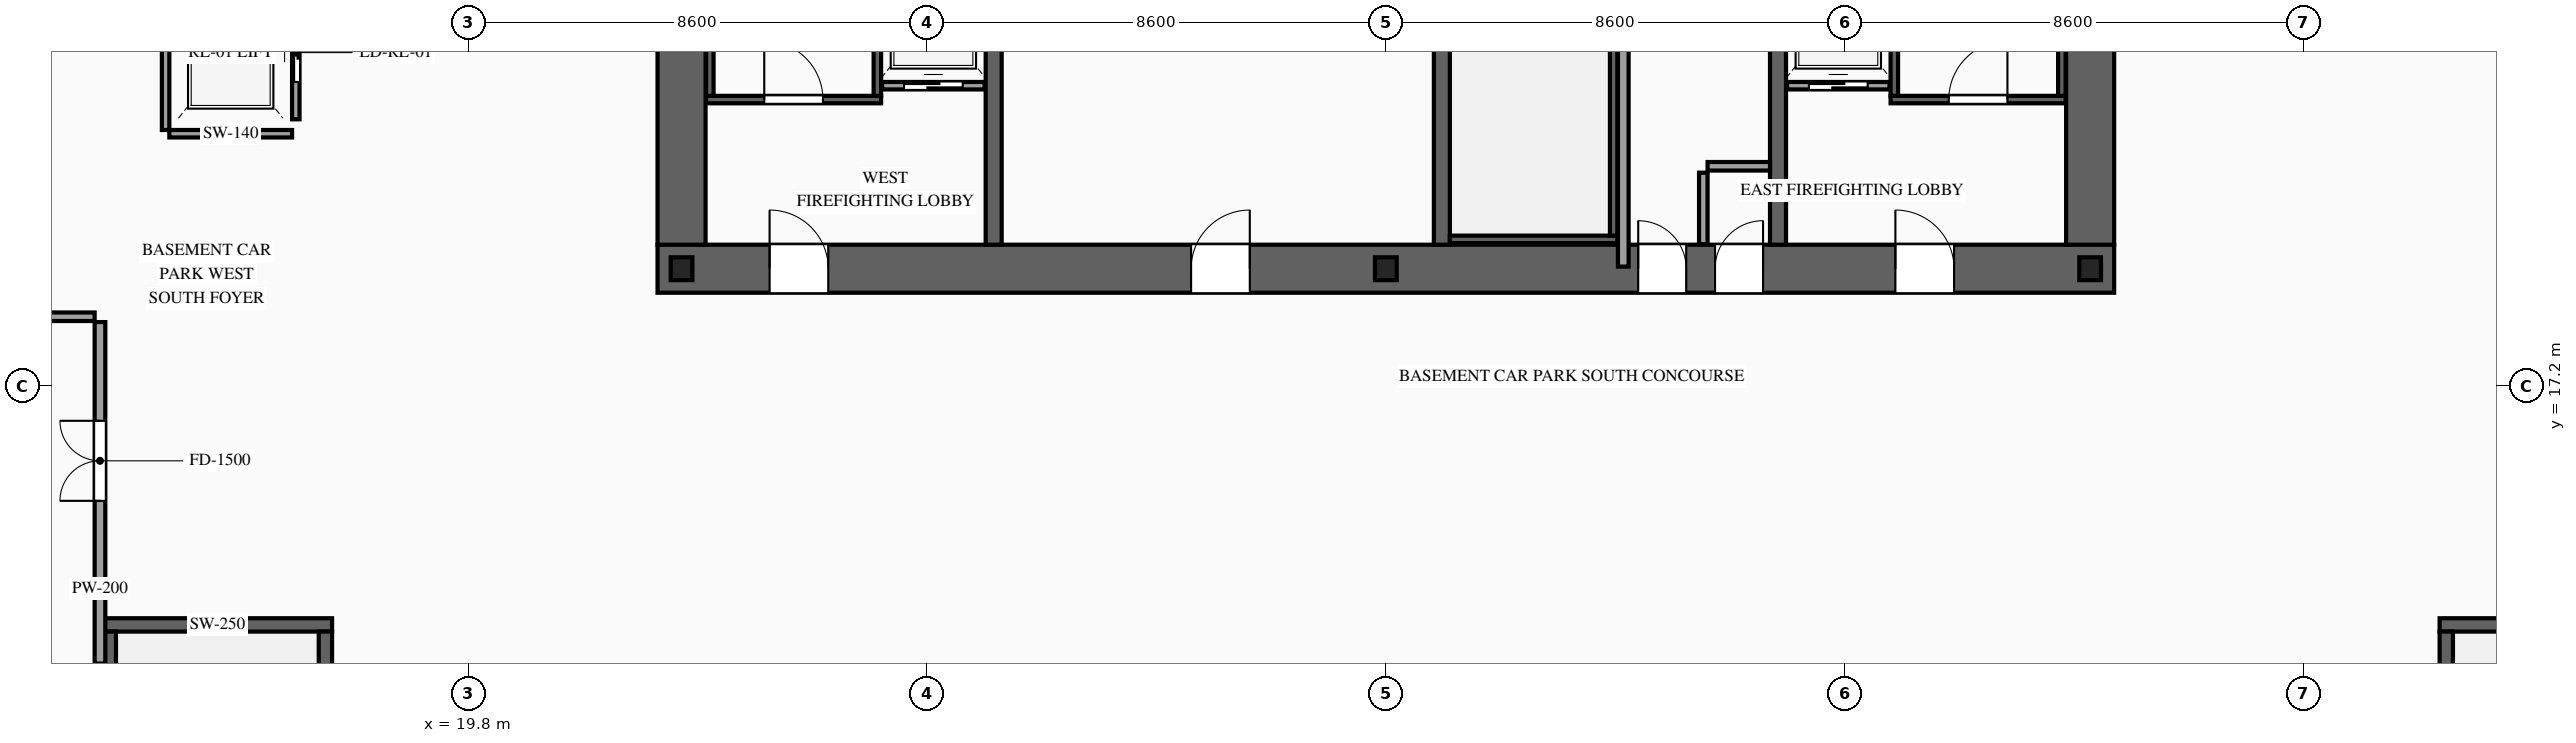
"""IFC4 building model, lengths in metres.
Left out: names, types, materials, properties, quantities, classifications, styles, units other than length and angle.
Written with IfcOpenShell. Run it as: python <this file> out.ifc"""

import sys

from ifc_helpers import new_model, si_unit, direction, frame, frame_2d, origin, origin_2d, place, context, subcontext, project, spatial, rectangle, i_section, extrude, source, transform, mapped, element, fill, save


model = new_model("IFC4")
c1 = context("Model", 3, precision=1e-05, world=origin(), true_north=direction((0.0, 1.0)))
c2 = subcontext(c1, "Body", "Model", "MODEL_VIEW")
j1 = project(units=[si_unit("LENGTHUNIT", "METRE"), si_unit("PLANEANGLEUNIT", "RADIAN")], contexts=[c1])
p1 = place(None, origin())
s1 = spatial("IfcSite", under=j1, at=p1, CompositionType="ELEMENT")
p2 = place(p1, origin())
s2 = spatial("IfcBuilding", under=s1, at=p2, CompositionType="ELEMENT")
p3 = place(p2, frame((0.0, 0.0, -9.0)))
s3 = spatial("IfcBuildingStorey", under=s2, at=p3, CompositionType="ELEMENT", Elevation=-9.0)
p4 = place(p3, frame((23.35, 19.4, 0.0), z_axis=(0.0, 0.0, 1.0), x_axis=(1.0, 0.0, 0.0)))
e1 = element("IfcWall", 1, at=p4, inside=s3, PredefinedType="SHEAR", context=c2, shape_type="SweptSolid", body=[
    extrude(rectangle(XDim=27.3, YDim=0.9, at=frame_2d((13.65, 0.0))), origin(), (0.0, 0.0, 1.0), 4.5),
])
p5 = place(p4, frame((2.1, 0.0, 0.0)))
e2 = element("IfcOpeningElement", 2, at=p5, cuts=e1, PredefinedType="OPENING", context=c2, shape_type="SweptSolid", body=[
    extrude(rectangle(XDim=1.1, YDim=2.2, at=frame_2d((0.55, 1.1))), frame((0.0, 0.465, 0.0), z_axis=(0.0, -1.0, 0.0), x_axis=(1.0, 0.0, 0.0)), (0.0, 0.0, 1.0), 0.93),
])
p6 = place(p4, frame((10.0, 0.0, 0.0)))
e3 = element("IfcOpeningElement", 3, at=p6, cuts=e1, PredefinedType="OPENING", context=c2, shape_type="SweptSolid", body=[
    extrude(rectangle(XDim=1.1, YDim=2.2, at=frame_2d((0.55, 1.1))), frame((0.0, 0.465, 0.0), z_axis=(0.0, -1.0, 0.0), x_axis=(1.0, 0.0, 0.0)), (0.0, 0.0, 1.0), 0.93),
])
p7 = place(p4, frame((23.2, 0.0, 0.0)))
e4 = element("IfcOpeningElement", 4, at=p7, cuts=e1, PredefinedType="OPENING", context=c2, shape_type="SweptSolid", body=[
    extrude(rectangle(XDim=1.1, YDim=2.2, at=frame_2d((0.55, 1.1))), frame((0.0, 0.465, 0.0), z_axis=(0.0, -1.0, 0.0), x_axis=(1.0, 0.0, 0.0)), (0.0, 0.0, 1.0), 0.93),
])
p8 = place(p4, frame((19.82, 0.0, 0.0)))
e5 = element("IfcOpeningElement", 5, at=p8, cuts=e1, PredefinedType="OPENING", context=c2, shape_type="SweptSolid", body=[
    extrude(rectangle(XDim=0.9, YDim=2.15, at=frame_2d((0.45, 1.075))), frame((0.0, 0.465, 0.0), z_axis=(0.0, -1.0, 0.0), x_axis=(1.0, 0.0, 0.0)), (0.0, 0.0, 1.0), 0.93),
])
p9 = place(p4, frame((18.38, 0.0, 0.0)))
e6 = element("IfcOpeningElement", 6, at=p9, cuts=e1, PredefinedType="OPENING", context=c2, shape_type="SweptSolid", body=[
    extrude(rectangle(XDim=0.9, YDim=2.15, at=frame_2d((0.45, 1.075))), frame((0.0, 0.465, 0.0), z_axis=(0.0, -1.0, 0.0), x_axis=(1.0, 0.0, 0.0)), (0.0, 0.0, 1.0), 0.93),
])
m1 = source(origin(), c2, "Body", "SweptSolid", [
    extrude(rectangle(XDim=11.9, YDim=0.9, at=frame_2d((5.95, 0.0))), origin(), (0.0, 0.0, 1.0), 4.5),
])
for number, where, z_axis, x_axis in (
    (7, (23.8, 19.85, 0.0), (0.0, 0.0, 1.0), (0.0, 1.0, 0.0)),
    (8, (50.2, 19.85, 0.0), (0.0, 0.0, 1.0), (0.0, 1.0, 0.0)),
):
    element("IfcWall", number, at=place(p3, frame(where, z_axis=z_axis, x_axis=x_axis)), inside=s3, PredefinedType="SHEAR", context=c2, shape_type="MappedRepresentation", body=[
        mapped(m1, transform((0.0, 0.0, 0.0), scale=1.0)),
    ])
m2 = source(origin(), c2, "Body", "SweptSolid", [
    extrude(rectangle(XDim=11.9, YDim=0.3, at=frame_2d((5.95, 0.0))), origin(), (0.0, 0.0, 1.0), 4.5),
])
for number, where, z_axis, x_axis in (
    (9, (29.65, 19.85, 0.0), (0.0, 0.0, 1.0), (0.0, 1.0, 0.0)),
    (10, (38.05, 19.85, 0.0), (0.0, 0.0, 1.0), (0.0, 1.0, 0.0)),
    (11, (44.35, 19.85, 0.0), (0.0, 0.0, 1.0), (0.0, 1.0, 0.0)),
):
    element("IfcWall", number, at=place(p3, frame(where, z_axis=z_axis, x_axis=x_axis)), inside=s3, PredefinedType="SOLIDWALL", context=c2, shape_type="MappedRepresentation", body=[
        mapped(m2, transform((0.0, 0.0, 0.0), scale=1.0)),
    ])
m3 = source(origin(), c2, "Body", "SweptSolid", [
    extrude(i_section(OverallWidth=0.407, OverallDepth=0.428, WebThickness=0.02, FlangeThickness=0.035, at=origin_2d()), origin(), (0.0, 0.0, 1.0), 4.5),
])
for number, where, z_axis, x_axis in (
    (12, (23.8, 19.4, 0.0), (0.0, 0.0, 1.0), (1.0, 0.0, 0.0)),
    (13, (37.0, 19.4, 0.0), (0.0, 0.0, 1.0), (1.0, 0.0, 0.0)),
    (14, (50.2, 19.4, 0.0), (0.0, 0.0, 1.0), (1.0, 0.0, 0.0)),
):
    element("IfcColumn", number, at=place(p3, frame(where, z_axis=z_axis, x_axis=x_axis)), inside=s3, PredefinedType="COLUMN", context=c2, shape_type="MappedRepresentation", body=[
        mapped(m3, transform((0.0, 0.0, 0.0), scale=1.0)),
    ])
p10 = place(p3, frame((27.56, 22.83, 0.0), z_axis=(0.0, 0.0, 1.0), x_axis=(1.0, 0.0, 0.0)))
e15 = element("IfcWall", 15, at=p10, inside=s3, PredefinedType="SOLIDWALL", context=c2, shape_type="SweptSolid", body=[
    extrude(rectangle(XDim=1.92, YDim=0.14, at=frame_2d((0.96, 0.0))), origin(), (0.0, 0.0, 1.0), 4.2),
])
p11 = place(p10, frame((0.41, 0.0, 0.0)))
e16 = element("IfcOpeningElement", 16, at=p11, cuts=e15, PredefinedType="OPENING", context=c2, shape_type="SweptSolid", body=[
    extrude(rectangle(XDim=1.1, YDim=2.2, at=frame_2d((0.55, 1.1))), frame((0.0, 0.085, 0.0), z_axis=(0.0, -1.0, 0.0), x_axis=(1.0, 0.0, 0.0)), (0.0, 0.0, 1.0), 0.17),
])
p12 = place(p3, frame((44.52, 22.83, 0.0), z_axis=(0.0, 0.0, 1.0), x_axis=(1.0, 0.0, 0.0)))
e17 = element("IfcWall", 17, at=p12, inside=s3, PredefinedType="SOLIDWALL", context=c2, shape_type="SweptSolid", body=[
    extrude(rectangle(XDim=1.92, YDim=0.14, at=frame_2d((0.96, 0.0))), origin(), (0.0, 0.0, 1.0), 4.2),
])
p13 = place(p12, frame((0.41, 0.0, 0.0)))
e18 = element("IfcOpeningElement", 18, at=p13, cuts=e17, PredefinedType="OPENING", context=c2, shape_type="SweptSolid", body=[
    extrude(rectangle(XDim=1.1, YDim=2.2, at=frame_2d((0.55, 1.1))), frame((0.0, 0.085, 0.0), z_axis=(0.0, -1.0, 0.0), x_axis=(1.0, 0.0, 0.0)), (0.0, 0.0, 1.0), 0.17),
])
p14 = place(p3, frame((16.57, 22.2, 0.0), z_axis=(0.0, 0.0, 1.0), x_axis=(0.0, 1.0, 0.0)))
e19 = element("IfcWall", 19, at=p14, inside=s3, PredefinedType="SOLIDWALL", context=c2, shape_type="SweptSolid", body=[
    extrude(rectangle(XDim=2.5, YDim=0.14, at=frame_2d((1.25, 0.0))), origin(), (0.0, 0.0, 1.0), 4.2),
])
p15 = place(p14, frame((0.7, 0.0, 0.0)))
e20 = element("IfcOpeningElement", 20, at=p15, cuts=e19, PredefinedType="OPENING", context=c2, shape_type="SweptSolid", body=[
    extrude(rectangle(XDim=1.1, YDim=2.2, at=frame_2d((0.55, 1.1))), frame((0.0, 0.085, 0.0), z_axis=(0.0, -1.0, 0.0), x_axis=(1.0, 0.0, 0.0)), (0.0, 0.0, 1.0), 0.17),
])
m4 = source(origin(), c2, "Body", "SweptSolid", [
    extrude(rectangle(XDim=5.8, YDim=0.14, at=frame_2d((2.9, 0.0))), origin(), (0.0, 0.0, 1.0), 4.2),
])
p16 = place(p3, frame((14.13, 22.0, 0.0), z_axis=(0.0, 0.0, 1.0), x_axis=(0.0, 1.0, 0.0)))
e21 = element("IfcWall", 21, at=p16, inside=s3, PredefinedType="SOLIDWALL", context=c2, shape_type="MappedRepresentation", body=[
    mapped(m4, transform((0.0, 0.0, 0.0), scale=1.0)),
])
m5 = source(origin(), c2, "Body", "SweptSolid", [
    extrude(rectangle(XDim=2.3, YDim=0.14, at=frame_2d((1.15, 0.0))), origin(), (0.0, 0.0, 1.0), 4.2),
])
p17 = place(p3, frame((14.2, 21.93, 0.0), z_axis=(0.0, 0.0, 1.0), x_axis=(1.0, 0.0, 0.0)))
e22 = element("IfcWall", 22, at=p17, inside=s3, PredefinedType="SOLIDWALL", context=c2, shape_type="MappedRepresentation", body=[
    mapped(m5, transform((0.0, 0.0, 0.0), scale=1.0)),
])
p18 = place(p3, frame((24.26, 22.57, 0.0), z_axis=(0.0, 0.0, 1.0), x_axis=(1.0, 0.0, 0.0)))
e23 = element("IfcWall", 23, at=p18, inside=s3, PredefinedType="SOLIDWALL", context=c2, shape_type="SweptSolid", body=[
    extrude(rectangle(XDim=3.28, YDim=0.14, at=frame_2d((1.64, 0.0))), origin(), (0.0, 0.0, 1.0), 4.2),
])
p19 = place(p18, frame((1.09, 0.0, 0.0)))
e24 = element("IfcOpeningElement", 24, at=p19, cuts=e23, PredefinedType="OPENING", context=c2, shape_type="SweptSolid", body=[
    extrude(rectangle(XDim=1.1, YDim=2.2, at=frame_2d((0.55, 1.1))), frame((0.0, 0.085, 0.0), z_axis=(0.0, -1.0, 0.0), x_axis=(1.0, 0.0, 0.0)), (0.0, 0.0, 1.0), 0.17),
])
m6 = source(origin(), c2, "Body", "SweptSolid", [
    extrude(rectangle(XDim=8.94, YDim=0.14, at=frame_2d((4.47, 0.0))), origin(), (0.0, 0.0, 1.0), 4.2),
])
for number, where, z_axis, x_axis in (
    (25, (24.33, 22.64, 0.0), (0.0, 0.0, 1.0), (0.0, 1.0, 0.0)),
    (26, (27.47, 22.64, 0.0), (0.0, 0.0, 1.0), (0.0, 1.0, 0.0)),
):
    element("IfcWall", number, at=place(p3, frame(where, z_axis=z_axis, x_axis=x_axis)), inside=s3, PredefinedType="SOLIDWALL", context=c2, shape_type="MappedRepresentation", body=[
        mapped(m6, transform((0.0, 0.0, 0.0), scale=1.0)),
    ])
p20 = place(p3, frame((46.46, 22.57, 0.0), z_axis=(0.0, 0.0, 1.0), x_axis=(1.0, 0.0, 0.0)))
e27 = element("IfcWall", 27, at=p20, inside=s3, PredefinedType="SOLIDWALL", context=c2, shape_type="SweptSolid", body=[
    extrude(rectangle(XDim=3.28, YDim=0.14, at=frame_2d((1.64, 0.0))), origin(), (0.0, 0.0, 1.0), 4.2),
])
p21 = place(p20, frame((1.09, 0.0, 0.0)))
e28 = element("IfcOpeningElement", 28, at=p21, cuts=e27, PredefinedType="OPENING", context=c2, shape_type="SweptSolid", body=[
    extrude(rectangle(XDim=1.1, YDim=2.2, at=frame_2d((0.55, 1.1))), frame((0.0, 0.085, 0.0), z_axis=(0.0, -1.0, 0.0), x_axis=(1.0, 0.0, 0.0)), (0.0, 0.0, 1.0), 0.17),
])
for number, where, z_axis, x_axis in (
    (29, (46.53, 22.64, 0.0), (0.0, 0.0, 1.0), (0.0, 1.0, 0.0)),
    (30, (49.67, 22.64, 0.0), (0.0, 0.0, 1.0), (0.0, 1.0, 0.0)),
):
    element("IfcWall", number, at=place(p3, frame(where, z_axis=z_axis, x_axis=x_axis)), inside=s3, PredefinedType="SOLIDWALL", context=c2, shape_type="MappedRepresentation", body=[
        mapped(m6, transform((0.0, 0.0, 0.0), scale=1.0)),
    ])
m7 = source(origin(), c2, "Body", "SweptSolid", [
    extrude(rectangle(XDim=3.14, YDim=0.14, at=frame_2d((1.57, 0.0))), origin(), (0.0, 0.0, 1.0), 4.2),
])
p22 = place(p3, frame((38.2, 19.95, 0.0), z_axis=(0.0, 0.0, 1.0), x_axis=(1.0, 0.0, 0.0)))
e31 = element("IfcWall", 31, at=p22, inside=s3, PredefinedType="SOLIDWALL", context=c2, shape_type="MappedRepresentation", body=[
    mapped(m7, transform((0.0, 0.0, 0.0), scale=1.0)),
])
m8 = source(origin(), c2, "Body", "SweptSolid", [
    extrude(rectangle(XDim=8.94, YDim=0.14, at=frame_2d((4.47, 0.0))), origin(), (0.0, 0.0, 1.0), 4.2),
])
p23 = place(p3, frame((41.27, 20.02, 0.0), z_axis=(0.0, 0.0, 1.0), x_axis=(0.0, 1.0, 0.0)))
e32 = element("IfcWall", 32, at=p23, inside=s3, PredefinedType="SOLIDWALL", context=c2, shape_type="MappedRepresentation", body=[
    mapped(m8, transform((0.0, 0.0, 0.0), scale=1.0)),
])
m9 = source(origin(), c2, "Body", "SweptSolid", [
    extrude(rectangle(XDim=4.3, YDim=0.25, at=frame_2d((2.15, 0.0))), origin(), (0.0, 0.0, 1.0), 4.2),
])
p24 = place(p3, frame((12.95, 12.725, 0.0), z_axis=(0.0, 0.0, 1.0), x_axis=(1.0, 0.0, 0.0)))
e33 = element("IfcWall", 33, at=p24, inside=s3, PredefinedType="SOLIDWALL", context=c2, shape_type="MappedRepresentation", body=[
    mapped(m9, transform((0.0, 0.0, 0.0), scale=1.0)),
])
m10 = source(origin(), c2, "Body", "SweptSolid", [
    extrude(rectangle(XDim=9.6, YDim=0.25, at=frame_2d((4.8, 0.0))), origin(), (0.0, 0.0, 1.0), 4.2),
])
p25 = place(p3, frame((13.075, 3.0, 0.0), z_axis=(0.0, 0.0, 1.0), x_axis=(0.0, 1.0, 0.0)))
e34 = element("IfcWall", 34, at=p25, inside=s3, PredefinedType="SOLIDWALL", context=c2, shape_type="MappedRepresentation", body=[
    mapped(m10, transform((0.0, 0.0, 0.0), scale=1.0)),
])
p26 = place(p3, frame((17.125, 3.0, 0.0), z_axis=(0.0, 0.0, 1.0), x_axis=(0.0, 1.0, 0.0)))
e35 = element("IfcWall", 35, at=p26, inside=s3, PredefinedType="SOLIDWALL", context=c2, shape_type="SweptSolid", body=[
    extrude(rectangle(XDim=9.6, YDim=0.25, at=frame_2d((4.8, 0.0))), origin(), (0.0, 0.0, 1.0), 4.2),
])
p27 = place(p26, frame((0.35, 0.0, 0.0)))
e36 = element("IfcOpeningElement", 36, at=p27, cuts=e35, PredefinedType="OPENING", context=c2, shape_type="SweptSolid", body=[
    extrude(rectangle(XDim=1.1, YDim=2.2, at=frame_2d((0.55, 1.1))), frame((0.0, 0.14, 0.0), z_axis=(0.0, -1.0, 0.0), x_axis=(1.0, 0.0, 0.0)), (0.0, 0.0, 1.0), 0.28),
])
p28 = place(p3, frame((56.75, 12.725, 0.0), z_axis=(0.0, 0.0, 1.0), x_axis=(1.0, 0.0, 0.0)))
e37 = element("IfcWall", 37, at=p28, inside=s3, PredefinedType="SOLIDWALL", context=c2, shape_type="MappedRepresentation", body=[
    mapped(m9, transform((0.0, 0.0, 0.0), scale=1.0)),
])
p29 = place(p3, frame((56.875, 3.0, 0.0), z_axis=(0.0, 0.0, 1.0), x_axis=(0.0, 1.0, 0.0)))
e38 = element("IfcWall", 38, at=p29, inside=s3, PredefinedType="SOLIDWALL", context=c2, shape_type="SweptSolid", body=[
    extrude(rectangle(XDim=9.6, YDim=0.25, at=frame_2d((4.8, 0.0))), origin(), (0.0, 0.0, 1.0), 4.2),
])
p30 = place(p29, frame((0.35, 0.0, 0.0)))
e39 = element("IfcOpeningElement", 39, at=p30, cuts=e38, PredefinedType="OPENING", context=c2, shape_type="SweptSolid", body=[
    extrude(rectangle(XDim=1.1, YDim=2.2, at=frame_2d((0.55, 1.1))), frame((0.0, 0.14, 0.0), z_axis=(0.0, -1.0, 0.0), x_axis=(1.0, 0.0, 0.0)), (0.0, 0.0, 1.0), 0.28),
])
m11 = source(origin(), c2, "Body", "SweptSolid", [
    extrude(rectangle(XDim=1.34, YDim=0.16, at=frame_2d((0.67, 0.0))), origin(), (0.0, 0.0, 1.0), 4.2),
])
p31 = place(p3, frame((42.95, 19.86, 0.0), z_axis=(0.0, 0.0, 1.0), x_axis=(0.0, 1.0, 0.0)))
e40 = element("IfcWall", 40, at=p31, inside=s3, PredefinedType="PARTITIONING", context=c2, shape_type="MappedRepresentation", body=[
    mapped(m11, transform((0.0, 0.0, 0.0), scale=1.0)),
])
m12 = source(origin(), c2, "Body", "SweptSolid", [
    extrude(rectangle(XDim=1.17, YDim=0.16, at=frame_2d((0.585, 0.0))), origin(), (0.0, 0.0, 1.0), 4.2),
])
p32 = place(p3, frame((43.03, 21.32, 0.0), z_axis=(0.0, 0.0, 1.0), x_axis=(1.0, 0.0, 0.0)))
e41 = element("IfcWall", 41, at=p32, inside=s3, PredefinedType="PARTITIONING", context=c2, shape_type="MappedRepresentation", body=[
    mapped(m12, transform((0.0, 0.0, 0.0), scale=1.0)),
])
m13 = source(origin(), c2, "Body", "SweptSolid", [
    extrude(rectangle(XDim=12.72, YDim=0.2, at=frame_2d((6.36, 0.0))), origin(), (0.0, 0.0, 1.0), 4.2),
])
p33 = place(p3, frame((41.45, 19.44, 0.0), z_axis=(0.0, 0.0, 1.0), x_axis=(0.0, 1.0, 0.0)))
e42 = element("IfcWall", 42, at=p33, inside=s3, PredefinedType="PARTITIONING", context=c2, shape_type="MappedRepresentation", body=[
    mapped(m13, transform((0.0, 0.0, 0.0), scale=1.0)),
])
p34 = place(p3, frame((12.9, 12.0, 0.0), z_axis=(0.0, 0.0, 1.0), x_axis=(0.0, 1.0, 0.0)))
e43 = element("IfcWall", 43, at=p34, inside=s3, PredefinedType="PARTITIONING", context=c2, shape_type="SweptSolid", body=[
    extrude(rectangle(XDim=6.4, YDim=0.2, at=frame_2d((3.2, 0.0))), origin(), (0.0, 0.0, 1.0), 4.2),
])
p35 = place(p34, frame((3.05, 0.0, 0.0)))
e44 = element("IfcOpeningElement", 44, at=p35, cuts=e43, PredefinedType="OPENING", context=c2, shape_type="SweptSolid", body=[
    extrude(rectangle(XDim=1.5, YDim=2.3, at=frame_2d((0.75, 1.15))), frame((0.0, 0.115, 0.0), z_axis=(0.0, -1.0, 0.0), x_axis=(1.0, 0.0, 0.0)), (0.0, 0.0, 1.0), 0.23),
])
m14 = source(origin(), c2, "Body", "SweptSolid", [
    extrude(rectangle(XDim=10.62, YDim=0.16, at=frame_2d((5.31, 0.0))), origin(), (0.0, 0.0, 1.0), 4.2),
])
p36 = place(p3, frame((2.18, 18.5, 0.0), z_axis=(0.0, 0.0, 1.0), x_axis=(1.0, 0.0, 0.0)))
e45 = element("IfcWall", 45, at=p36, inside=s3, PredefinedType="PARTITIONING", context=c2, shape_type="MappedRepresentation", body=[
    mapped(m14, transform((0.0, 0.0, 0.0), scale=1.0)),
])
m15 = source(origin(), c2, "Body", "SweptSolid", [
    extrude(rectangle(XDim=1.1, YDim=2.2, at=frame_2d((0.55, 1.1))), frame((0.0, 0.025, 0.0), z_axis=(0.0, -1.0, 0.0), x_axis=(1.0, 0.0, 0.0)), (0.0, 0.0, 1.0), 0.05),
])
p37 = place(p11, origin())
e46 = element("IfcDoor", 46, at=p37, inside=s3, OperationType="SLIDING_TO_LEFT", PredefinedType="DOOR", context=c2, shape_type="MappedRepresentation", body=[
    mapped(m15, transform((0.0, 0.0, 0.0), scale=1.0)),
])
fill(e16, e46)
p38 = place(p13, origin())
e47 = element("IfcDoor", 47, at=p38, inside=s3, OperationType="SLIDING_TO_RIGHT", PredefinedType="DOOR", context=c2, shape_type="MappedRepresentation", body=[
    mapped(m15, transform((0.0, 0.0, 0.0), scale=1.0)),
])
fill(e18, e47)
p39 = place(p15, origin())
e48 = element("IfcDoor", 48, at=p39, inside=s3, OperationType="SLIDING_TO_RIGHT", PredefinedType="DOOR", context=c2, shape_type="MappedRepresentation", body=[
    mapped(m15, transform((0.0, 0.0, 0.0), scale=1.0)),
])
fill(e20, e48)
m16 = source(origin(), c2, "Body", "SweptSolid", [
    extrude(rectangle(XDim=1.1, YDim=2.2, at=frame_2d((0.55, 1.1))), frame((0.0, 0.025, 0.0), z_axis=(0.0, -1.0, 0.0), x_axis=(1.0, 0.0, 0.0)), (0.0, 0.0, 1.0), 0.05),
])
p40 = place(p19, origin())
e49 = element("IfcDoor", 49, at=p40, inside=s3, OperationType="SINGLE_SWING_LEFT", PredefinedType="DOOR", context=c2, shape_type="MappedRepresentation", body=[
    mapped(m16, transform((0.0, 0.0, 0.0), scale=1.0)),
])
fill(e24, e49)
p41 = place(p21, origin())
e50 = element("IfcDoor", 50, at=p41, inside=s3, OperationType="SINGLE_SWING_RIGHT", PredefinedType="DOOR", context=c2, shape_type="MappedRepresentation", body=[
    mapped(m16, transform((0.0, 0.0, 0.0), scale=1.0)),
])
fill(e28, e50)
p42 = place(p5, origin())
e51 = element("IfcDoor", 51, at=p42, inside=s3, OperationType="SINGLE_SWING_LEFT", PredefinedType="DOOR", context=c2, shape_type="MappedRepresentation", body=[
    mapped(m16, transform((0.0, 0.0, 0.0), scale=1.0)),
])
fill(e2, e51)
p43 = place(p6, origin())
e52 = element("IfcDoor", 52, at=p43, inside=s3, OperationType="SINGLE_SWING_RIGHT", PredefinedType="DOOR", context=c2, shape_type="MappedRepresentation", body=[
    mapped(m16, transform((0.0, 0.0, 0.0), scale=1.0)),
])
fill(e3, e52)
p44 = place(p7, origin())
e53 = element("IfcDoor", 53, at=p44, inside=s3, OperationType="SINGLE_SWING_LEFT", PredefinedType="DOOR", context=c2, shape_type="MappedRepresentation", body=[
    mapped(m16, transform((0.0, 0.0, 0.0), scale=1.0)),
])
fill(e4, e53)
m17 = source(origin(), c2, "Body", "SweptSolid", [
    extrude(rectangle(XDim=0.9, YDim=2.15, at=frame_2d((0.45, 1.075))), frame((0.0, 0.025, 0.0), z_axis=(0.0, -1.0, 0.0), x_axis=(1.0, 0.0, 0.0)), (0.0, 0.0, 1.0), 0.05),
])
p45 = place(p8, origin())
e54 = element("IfcDoor", 54, at=p45, inside=s3, OperationType="SINGLE_SWING_RIGHT", PredefinedType="DOOR", context=c2, shape_type="MappedRepresentation", body=[
    mapped(m17, transform((0.0, 0.0, 0.0), scale=1.0)),
])
fill(e5, e54)
p46 = place(p9, origin())
e55 = element("IfcDoor", 55, at=p46, inside=s3, OperationType="SINGLE_SWING_LEFT", PredefinedType="DOOR", context=c2, shape_type="MappedRepresentation", body=[
    mapped(m17, transform((0.0, 0.0, 0.0), scale=1.0)),
])
fill(e6, e55)
m18 = source(origin(), c2, "Body", "SweptSolid", [
    extrude(rectangle(XDim=1.5, YDim=2.3, at=frame_2d((0.75, 1.15))), frame((0.0, 0.025, 0.0), z_axis=(0.0, -1.0, 0.0), x_axis=(1.0, 0.0, 0.0)), (0.0, 0.0, 1.0), 0.05),
])
p47 = place(p35, origin())
e56 = element("IfcDoor", 56, at=p47, inside=s3, OperationType="DOUBLE_DOOR_SINGLE_SWING", PredefinedType="DOOR", context=c2, shape_type="MappedRepresentation", body=[
    mapped(m18, transform((0.0, 0.0, 0.0), scale=1.0)),
])
fill(e44, e56)
save(model, sys.argv[1])
